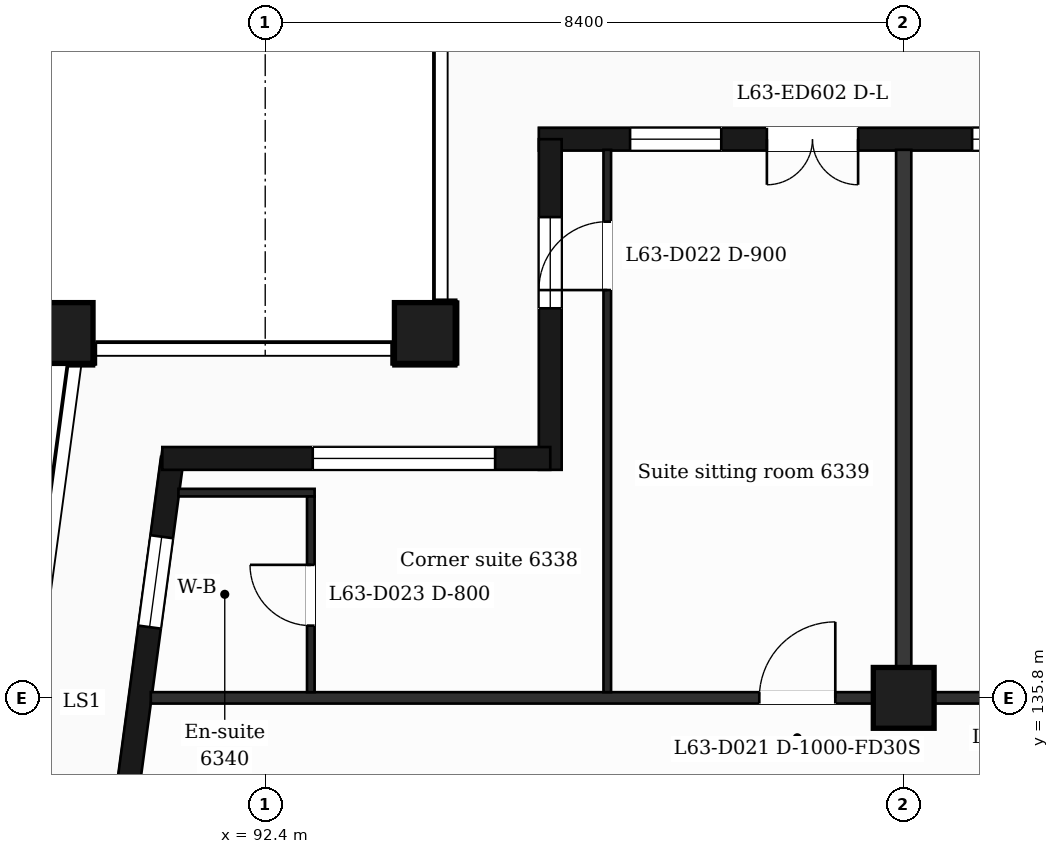
"""IFC4 building model, lengths in metres.
Left out: names, types, materials, properties, quantities, classifications, styles, units other than length and angle.
Written with IfcOpenShell. Run it as: python <this file> out.ifc"""

import sys

from ifc_helpers import new_model, si_unit, direction, frame, frame_2d, origin, origin_2d, place, context, subcontext, project, spatial, rectangle, extrude, element, fill, save


model = new_model("IFC4")
c1 = context("Model", 3, precision=1e-05, world=origin(), true_north=direction((0.0, 1.0)))
c2 = subcontext(c1, "Body", "Model", "MODEL_VIEW")
j1 = project(units=[si_unit("LENGTHUNIT", "METRE"), si_unit("PLANEANGLEUNIT", "RADIAN")], contexts=[c1])
p1 = place(None, origin())
s1 = spatial("IfcSite", under=j1, at=p1, CompositionType="ELEMENT")
p2 = place(p1, origin())
s2 = spatial("IfcBuilding", under=s1, at=p2, CompositionType="ELEMENT")
p3 = place(p2, frame((0.0, 0.0, 262.7)))
s3 = spatial("IfcBuildingStorey", under=s2, at=p3, CompositionType="ELEMENT", Elevation=262.7)
for number, where, z_axis, x_axis in (
    (1, (94.5, 140.6, 0.0), (0.0, 0.0, 1.0), (1.0, 0.0, 0.0)),
    (2, (89.735, 140.6, 0.0), (0.0, 0.0, 1.0), (1.0, 0.0, 0.0)),
    (3, (100.8, 135.8, 0.0), (0.0, 0.0, 1.0), (1.0, 0.0, 0.0)),
):
    element("IfcColumn", number, at=place(p3, frame(where, z_axis=z_axis, x_axis=x_axis)), inside=s3, PredefinedType="COLUMN", context=c2, shape_type="SweptSolid", body=[
        extrude(rectangle(XDim=0.8, YDim=0.8, at=origin_2d()), origin(), (0.0, 0.0, 1.0), 3.7),
    ])
p4 = place(p3, frame((91.177, 138.95, 0.0), z_axis=(0.0, 0.0, 1.0), x_axis=(-0.133426664613, -0.991058689065, 0.0)))
e4 = element("IfcWall", 4, at=p4, inside=s3, PredefinedType="SOLIDWALL", context=c2, shape_type="SweptSolid", body=[
    extrude(rectangle(XDim=6.609, YDim=0.3, at=frame_2d((3.305, 0.0))), origin(), (0.0, 0.0, 1.0), 3.38),
])
p5 = place(p4, frame((1.039, 0.0, 0.9)))
e5 = element("IfcOpeningElement", 5, at=p5, cuts=e4, PredefinedType="OPENING", context=c2, shape_type="SweptSolid", body=[
    extrude(rectangle(XDim=1.2, YDim=2.1, at=frame_2d((0.6, 1.05))), frame((0.0, 0.16, 0.0), z_axis=(0.0, -1.0, 0.0), x_axis=(1.0, 0.0, 0.0)), (0.0, 0.0, 1.0), 0.32),
])
p6 = place(p4, frame((4.294, 0.0, 0.0)))
e6 = element("IfcOpeningElement", 6, at=p6, cuts=e4, PredefinedType="OPENING", context=c2, shape_type="SweptSolid", body=[
    extrude(rectangle(XDim=1.2, YDim=2.4, at=frame_2d((0.6, 1.2))), frame((0.0, 0.16, 0.0), z_axis=(0.0, -1.0, 0.0), x_axis=(1.0, 0.0, 0.0)), (0.0, 0.0, 1.0), 0.32),
])
p7 = place(p3, frame((112.5, 143.15, 0.0), z_axis=(0.0, 0.0, 1.0), x_axis=(-1.0, 0.0, 0.0)))
e7 = element("IfcWall", 7, at=p7, inside=s3, PredefinedType="SOLIDWALL", context=c2, shape_type="SweptSolid", body=[
    extrude(rectangle(XDim=16.5, YDim=0.3, at=frame_2d((8.25, 0.0))), origin(), (0.0, 0.0, 1.0), 3.38),
])
p8 = place(p7, frame((1.1, 0.0, 0.9)))
e8 = element("IfcOpeningElement", 8, at=p8, cuts=e7, PredefinedType="OPENING", context=c2, shape_type="SweptSolid", body=[
    extrude(rectangle(XDim=1.2, YDim=2.1, at=frame_2d((0.6, 1.05))), frame((0.0, 0.16, 0.0), z_axis=(0.0, -1.0, 0.0), x_axis=(1.0, 0.0, 0.0)), (0.0, 0.0, 1.0), 0.32),
])
p9 = place(p7, frame((4.2, 0.0, 0.9)))
e9 = element("IfcOpeningElement", 9, at=p9, cuts=e7, PredefinedType="OPENING", context=c2, shape_type="SweptSolid", body=[
    extrude(rectangle(XDim=2.4, YDim=2.1, at=frame_2d((1.2, 1.05))), frame((0.0, 0.16, 0.0), z_axis=(0.0, -1.0, 0.0), x_axis=(1.0, 0.0, 0.0)), (0.0, 0.0, 1.0), 0.32),
])
p10 = place(p7, frame((8.4, 0.0, 0.9)))
e10 = element("IfcOpeningElement", 10, at=p10, cuts=e7, PredefinedType="OPENING", context=c2, shape_type="SweptSolid", body=[
    extrude(rectangle(XDim=2.4, YDim=2.1, at=frame_2d((1.2, 1.05))), frame((0.0, 0.16, 0.0), z_axis=(0.0, -1.0, 0.0), x_axis=(1.0, 0.0, 0.0)), (0.0, 0.0, 1.0), 0.32),
])
p11 = place(p7, frame((12.3, 0.0, 0.0)))
e11 = element("IfcOpeningElement", 11, at=p11, cuts=e7, PredefinedType="OPENING", context=c2, shape_type="SweptSolid", body=[
    extrude(rectangle(XDim=1.2, YDim=2.4, at=frame_2d((0.6, 1.2))), frame((0.0, 0.16, 0.0), z_axis=(0.0, -1.0, 0.0), x_axis=(1.0, 0.0, 0.0)), (0.0, 0.0, 1.0), 0.32),
])
p12 = place(p7, frame((14.1, 0.0, 0.9)))
e12 = element("IfcOpeningElement", 12, at=p12, cuts=e7, PredefinedType="OPENING", context=c2, shape_type="SweptSolid", body=[
    extrude(rectangle(XDim=1.2, YDim=2.1, at=frame_2d((0.6, 1.05))), frame((0.0, 0.16, 0.0), z_axis=(0.0, -1.0, 0.0), x_axis=(1.0, 0.0, 0.0)), (0.0, 0.0, 1.0), 0.32),
])
p13 = place(p3, frame((96.15, 143.15, 0.0), z_axis=(0.0, 0.0, 1.0), x_axis=(0.0, -1.0, 0.0)))
e13 = element("IfcWall", 13, at=p13, inside=s3, PredefinedType="SOLIDWALL", context=c2, shape_type="SweptSolid", body=[
    extrude(rectangle(XDim=4.35, YDim=0.3, at=frame_2d((2.175, 0.0))), origin(), (0.0, 0.0, 1.0), 3.38),
])
p14 = place(p13, frame((1.025, 0.0, 0.9)))
e14 = element("IfcOpeningElement", 14, at=p14, cuts=e13, PredefinedType="OPENING", context=c2, shape_type="SweptSolid", body=[
    extrude(rectangle(XDim=1.2, YDim=2.1, at=frame_2d((0.6, 1.05))), frame((0.0, 0.16, 0.0), z_axis=(0.0, -1.0, 0.0), x_axis=(1.0, 0.0, 0.0)), (0.0, 0.0, 1.0), 0.32),
])
p15 = place(p3, frame((96.15, 138.95, 0.0), z_axis=(0.0, 0.0, 1.0), x_axis=(-1.0, 0.0, 0.0)))
e15 = element("IfcWall", 15, at=p15, inside=s3, PredefinedType="SOLIDWALL", context=c2, shape_type="SweptSolid", body=[
    extrude(rectangle(XDim=5.104, YDim=0.3, at=frame_2d((2.552, 0.0))), origin(), (0.0, 0.0, 1.0), 3.38),
])
p16 = place(p15, frame((0.725, 0.0, 0.9)))
e16 = element("IfcOpeningElement", 16, at=p16, cuts=e15, PredefinedType="OPENING", context=c2, shape_type="SweptSolid", body=[
    extrude(rectangle(XDim=2.4, YDim=2.1, at=frame_2d((1.2, 1.05))), frame((0.0, 0.16, 0.0), z_axis=(0.0, -1.0, 0.0), x_axis=(1.0, 0.0, 0.0)), (0.0, 0.0, 1.0), 0.32),
])
p17 = place(p3, frame((90.895, 135.8, 0.0), z_axis=(0.0, 0.0, 1.0), x_axis=(1.0, 0.0, 0.0)))
e17 = element("IfcWall", 17, at=p17, inside=s3, PredefinedType="PARTITIONING", context=c2, shape_type="SweptSolid", body=[
    extrude(rectangle(XDim=45.011, YDim=0.15, at=frame_2d((22.505, 0.0))), origin(), (0.0, 0.0, 1.0), 3.38),
])
p18 = place(p17, frame((8.005, 0.0, 0.0)))
e18 = element("IfcOpeningElement", 18, at=p18, cuts=e17, PredefinedType="OPENING", context=c2, shape_type="SweptSolid", body=[
    extrude(rectangle(XDim=1.0, YDim=2.1, at=frame_2d((0.5, 1.05))), frame((0.0, 0.085, 0.0), z_axis=(0.0, -1.0, 0.0), x_axis=(1.0, 0.0, 0.0)), (0.0, 0.0, 1.0), 0.17),
])
p19 = place(p17, frame((11.93, 0.0, 0.0)))
e19 = element("IfcOpeningElement", 19, at=p19, cuts=e17, PredefinedType="OPENING", context=c2, shape_type="SweptSolid", body=[
    extrude(rectangle(XDim=1.0, YDim=2.1, at=frame_2d((0.5, 1.05))), frame((0.0, 0.085, 0.0), z_axis=(0.0, -1.0, 0.0), x_axis=(1.0, 0.0, 0.0)), (0.0, 0.0, 1.0), 0.17),
])
p20 = place(p17, frame((22.755, 0.0, 0.0)))
e20 = element("IfcOpeningElement", 20, at=p20, cuts=e17, PredefinedType="OPENING", context=c2, shape_type="SweptSolid", body=[
    extrude(rectangle(XDim=1.0, YDim=2.1, at=frame_2d((0.5, 1.05))), frame((0.0, 0.085, 0.0), z_axis=(0.0, -1.0, 0.0), x_axis=(1.0, 0.0, 0.0)), (0.0, 0.0, 1.0), 0.17),
])
p21 = place(p17, frame((28.305, 0.0, 0.0)))
e21 = element("IfcOpeningElement", 21, at=p21, cuts=e17, PredefinedType="OPENING", context=c2, shape_type="SweptSolid", body=[
    extrude(rectangle(XDim=1.0, YDim=2.1, at=frame_2d((0.5, 1.05))), frame((0.0, 0.085, 0.0), z_axis=(0.0, -1.0, 0.0), x_axis=(1.0, 0.0, 0.0)), (0.0, 0.0, 1.0), 0.17),
])
p22 = place(p17, frame((37.195, 0.0, 0.0)))
e22 = element("IfcOpeningElement", 22, at=p22, cuts=e17, PredefinedType="OPENING", context=c2, shape_type="SweptSolid", body=[
    extrude(rectangle(XDim=1.0, YDim=2.1, at=frame_2d((0.5, 1.05))), frame((0.0, 0.085, 0.0), z_axis=(0.0, -1.0, 0.0), x_axis=(1.0, 0.0, 0.0)), (0.0, 0.0, 1.0), 0.17),
])
p23 = place(p3, frame((91.258, 138.5, 0.0), z_axis=(0.0, 0.0, 1.0), x_axis=(1.0, 0.0, 0.0)))
e23 = element("IfcWall", 23, at=p23, inside=s3, PredefinedType="PARTITIONING", context=c2, shape_type="SweptSolid", body=[
    extrude(rectangle(XDim=1.792, YDim=0.1, at=frame_2d((0.896, 0.0))), origin(), (0.0, 0.0, 1.0), 3.38),
])
p24 = place(p3, frame((93.0, 135.875, 0.0), z_axis=(0.0, 0.0, 1.0), x_axis=(0.0, 1.0, 0.0)))
e24 = element("IfcWall", 24, at=p24, inside=s3, PredefinedType="PARTITIONING", context=c2, shape_type="SweptSolid", body=[
    extrude(rectangle(XDim=2.575, YDim=0.1, at=frame_2d((1.288, 0.0))), origin(), (0.0, 0.0, 1.0), 3.38),
])
p25 = place(p24, frame((0.875, 0.0, 0.0)))
e25 = element("IfcOpeningElement", 25, at=p25, cuts=e24, PredefinedType="OPENING", context=c2, shape_type="SweptSolid", body=[
    extrude(rectangle(XDim=0.8, YDim=2.1, at=frame_2d((0.4, 1.05))), frame((0.0, 0.06, 0.0), z_axis=(0.0, -1.0, 0.0), x_axis=(1.0, 0.0, 0.0)), (0.0, 0.0, 1.0), 0.12),
])
p26 = place(p3, frame((96.9, 135.875, 0.0), z_axis=(0.0, 0.0, 1.0), x_axis=(0.0, 1.0, 0.0)))
e26 = element("IfcWall", 26, at=p26, inside=s3, PredefinedType="PARTITIONING", context=c2, shape_type="SweptSolid", body=[
    extrude(rectangle(XDim=7.135, YDim=0.1, at=frame_2d((3.567, 0.0))), origin(), (0.0, 0.0, 1.0), 3.38),
])
p27 = place(p26, frame((5.29, 0.0, 0.0)))
e27 = element("IfcOpeningElement", 27, at=p27, cuts=e26, PredefinedType="OPENING", context=c2, shape_type="SweptSolid", body=[
    extrude(rectangle(XDim=0.9, YDim=2.1, at=frame_2d((0.45, 1.05))), frame((0.0, 0.06, 0.0), z_axis=(0.0, -1.0, 0.0), x_axis=(1.0, 0.0, 0.0)), (0.0, 0.0, 1.0), 0.12),
])
p28 = place(p3, frame((100.8, 135.875, 0.0), z_axis=(0.0, 0.0, 1.0), x_axis=(0.0, 1.0, 0.0)))
e28 = element("IfcWall", 28, at=p28, inside=s3, PredefinedType="PARTITIONING", context=c2, shape_type="SweptSolid", body=[
    extrude(rectangle(XDim=7.135, YDim=0.2, at=frame_2d((3.567, 0.0))), origin(), (0.0, 0.0, 1.0), 3.38),
])
p29 = place(p5, origin())
e29 = element("IfcWindow", 29, at=p29, inside=s3, PartitioningType="SINGLE_PANEL", PredefinedType="WINDOW", context=c2, shape_type="SweptSolid", body=[
    extrude(rectangle(XDim=1.2, YDim=2.1, at=frame_2d((0.6, 1.05))), frame((0.0, 0.03, 0.0), z_axis=(0.0, -1.0, 0.0), x_axis=(1.0, 0.0, 0.0)), (0.0, 0.0, 1.0), 0.06),
])
fill(e5, e29)
p30 = place(p10, origin())
e30 = element("IfcWindow", 30, at=p30, inside=s3, PartitioningType="SINGLE_PANEL", PredefinedType="WINDOW", context=c2, shape_type="SweptSolid", body=[
    extrude(rectangle(XDim=2.4, YDim=2.1, at=frame_2d((1.2, 1.05))), frame((0.0, 0.03, 0.0), z_axis=(0.0, -1.0, 0.0), x_axis=(1.0, 0.0, 0.0)), (0.0, 0.0, 1.0), 0.06),
])
fill(e10, e30)
p31 = place(p11, origin())
e31 = element("IfcDoor", 31, at=p31, inside=s3, OperationType="DOUBLE_DOOR_SINGLE_SWING", PredefinedType="DOOR", context=c2, shape_type="SweptSolid", body=[
    extrude(rectangle(XDim=1.2, YDim=2.4, at=frame_2d((0.6, 1.2))), frame((0.0, 0.025, 0.0), z_axis=(0.0, -1.0, 0.0), x_axis=(1.0, 0.0, 0.0)), (0.0, 0.0, 1.0), 0.05),
])
fill(e11, e31)
p32 = place(p12, origin())
e32 = element("IfcWindow", 32, at=p32, inside=s3, PartitioningType="SINGLE_PANEL", PredefinedType="WINDOW", context=c2, shape_type="SweptSolid", body=[
    extrude(rectangle(XDim=1.2, YDim=2.1, at=frame_2d((0.6, 1.05))), frame((0.0, 0.03, 0.0), z_axis=(0.0, -1.0, 0.0), x_axis=(1.0, 0.0, 0.0)), (0.0, 0.0, 1.0), 0.06),
])
fill(e12, e32)
p33 = place(p14, origin())
e33 = element("IfcWindow", 33, at=p33, inside=s3, PartitioningType="SINGLE_PANEL", PredefinedType="WINDOW", context=c2, shape_type="SweptSolid", body=[
    extrude(rectangle(XDim=1.2, YDim=2.1, at=frame_2d((0.6, 1.05))), frame((0.0, 0.03, 0.0), z_axis=(0.0, -1.0, 0.0), x_axis=(1.0, 0.0, 0.0)), (0.0, 0.0, 1.0), 0.06),
])
fill(e14, e33)
p34 = place(p16, origin())
e34 = element("IfcWindow", 34, at=p34, inside=s3, PartitioningType="SINGLE_PANEL", PredefinedType="WINDOW", context=c2, shape_type="SweptSolid", body=[
    extrude(rectangle(XDim=2.4, YDim=2.1, at=frame_2d((1.2, 1.05))), frame((0.0, 0.03, 0.0), z_axis=(0.0, -1.0, 0.0), x_axis=(1.0, 0.0, 0.0)), (0.0, 0.0, 1.0), 0.06),
])
fill(e16, e34)
p35 = place(p18, origin())
e35 = element("IfcDoor", 35, at=p35, inside=s3, OperationType="SINGLE_SWING_RIGHT", PredefinedType="DOOR", context=c2, shape_type="SweptSolid", body=[
    extrude(rectangle(XDim=1.0, YDim=2.1, at=frame_2d((0.5, 1.05))), frame((0.0, 0.025, 0.0), z_axis=(0.0, -1.0, 0.0), x_axis=(1.0, 0.0, 0.0)), (0.0, 0.0, 1.0), 0.05),
])
fill(e18, e35)
p36 = place(p27, origin())
e36 = element("IfcDoor", 36, at=p36, inside=s3, OperationType="SINGLE_SWING_LEFT", PredefinedType="DOOR", context=c2, shape_type="SweptSolid", body=[
    extrude(rectangle(XDim=0.9, YDim=2.1, at=frame_2d((0.45, 1.05))), frame((0.0, 0.025, 0.0), z_axis=(0.0, -1.0, 0.0), x_axis=(1.0, 0.0, 0.0)), (0.0, 0.0, 1.0), 0.05),
])
fill(e27, e36)
p37 = place(p25, origin())
e37 = element("IfcDoor", 37, at=p37, inside=s3, OperationType="SINGLE_SWING_RIGHT", PredefinedType="DOOR", context=c2, shape_type="SweptSolid", body=[
    extrude(rectangle(XDim=0.8, YDim=2.1, at=frame_2d((0.4, 1.05))), frame((0.0, 0.025, 0.0), z_axis=(0.0, -1.0, 0.0), x_axis=(1.0, 0.0, 0.0)), (0.0, 0.0, 1.0), 0.05),
])
fill(e25, e37)
save(model, sys.argv[1])
